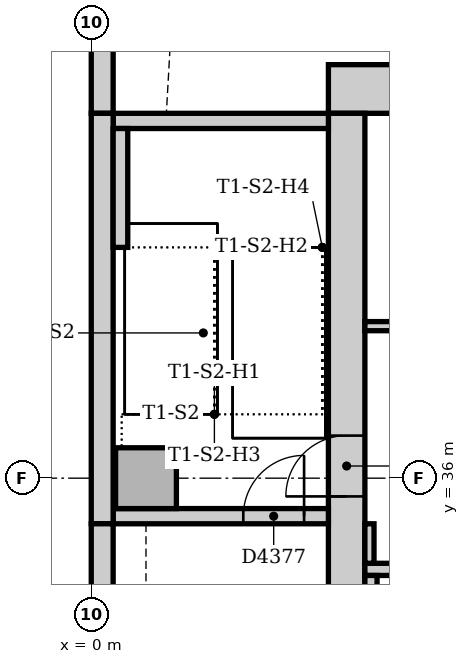
"""IFC4 building model, lengths in metres.
Left out: names, types, materials, properties, quantities, classifications, styles, units other than length and angle.
Written with IfcOpenShell. Run it as: python <this file> out.ifc"""

import sys

from ifc_helpers import new_model, si_unit, direction, frame, frame_2d, origin, origin_2d, place, context, subcontext, project, spatial, rectangle, extrude, element, fill, save


model = new_model("IFC4")
c1 = context("Model", 3, precision=1e-05, world=origin(), true_north=direction((0.0, 1.0)))
c2 = subcontext(c1, "Body", "Model", "MODEL_VIEW")
j1 = project(units=[si_unit("LENGTHUNIT", "METRE"), si_unit("PLANEANGLEUNIT", "RADIAN")], contexts=[c1])
p1 = place(None, origin())
s1 = spatial("IfcSite", under=j1, at=p1, CompositionType="ELEMENT")
p2 = place(p1, origin())
s2 = spatial("IfcBuilding", under=s1, at=p2, CompositionType="ELEMENT")
p3 = place(p2, frame((0.0, 0.0, 144.0)))
s3 = spatial("IfcBuildingStorey", under=s2, at=p3, CompositionType="ELEMENT", Elevation=144.0)
p4 = place(p3, frame((23.3, 42.4, 0.0), z_axis=(0.0, 0.0, 1.0), x_axis=(-1.0, 0.0, 0.0)))
e1 = element("IfcWall", 1, at=p4, inside=s3, PredefinedType="SOLIDWALL", context=c2, shape_type="SweptSolid", body=[
    extrude(rectangle(XDim=19.4, YDim=0.8, at=frame_2d((9.7, 0.0))), origin(), (0.0, 0.0, 1.0), 5.0),
])
p5 = place(p3, frame((4.2, 42.0, 0.0), z_axis=(0.0, 0.0, 1.0), x_axis=(0.0, -1.0, 0.0)))
e2 = element("IfcWall", 2, at=p5, inside=s3, PredefinedType="SOLIDWALL", context=c2, shape_type="SweptSolid", body=[
    extrude(rectangle(XDim=10.5, YDim=0.6, at=frame_2d((5.25, 0.0))), origin(), (0.0, 0.0, 1.0), 5.0),
])
p6 = place(p5, frame((5.3, 0.0, 0.0)))
e3 = element("IfcOpeningElement", 3, at=p6, cuts=e2, PredefinedType="OPENING", context=c2, shape_type="SweptSolid", body=[
    extrude(rectangle(XDim=1.0, YDim=2.1, at=frame_2d((0.5, 1.05))), frame((0.0, 0.31, 0.0), z_axis=(0.0, -1.0, 0.0), x_axis=(1.0, 0.0, 0.0)), (0.0, 0.0, 1.0), 0.62),
])
p7 = place(p3, frame((0.36, 35.375, 0.0), z_axis=(0.0, 0.0, 1.0), x_axis=(1.0, 0.0, 0.0)))
e4 = element("IfcWall", 4, at=p7, inside=s3, PredefinedType="SOLIDWALL", context=c2, shape_type="SweptSolid", body=[
    extrude(rectangle(XDim=3.54, YDim=0.25, at=frame_2d((1.77, 0.0))), origin(), (0.0, 0.0, 1.0), 5.0),
])
p8 = place(p7, frame((2.14, 0.0, 0.0)))
e5 = element("IfcOpeningElement", 5, at=p8, cuts=e4, PredefinedType="OPENING", context=c2, shape_type="SweptSolid", body=[
    extrude(rectangle(XDim=1.0, YDim=2.1, at=frame_2d((0.5, 1.05))), frame((0.0, 0.135, 0.0), z_axis=(0.0, -1.0, 0.0), x_axis=(1.0, 0.0, 0.0)), (0.0, 0.0, 1.0), 0.27),
])
p9 = place(p3, frame((3.9, 41.875, 0.0), z_axis=(0.0, 0.0, 1.0), x_axis=(-1.0, 0.0, 0.0)))
e6 = element("IfcWall", 6, at=p9, inside=s3, PredefinedType="SOLIDWALL", context=c2, shape_type="SweptSolid", body=[
    extrude(rectangle(XDim=3.54, YDim=0.25, at=frame_2d((1.77, 0.0))), origin(), (0.0, 0.0, 1.0), 5.0),
])
p10 = place(p3, frame((0.9, 36.0, 0.0), z_axis=(0.0, 0.0, 1.0), x_axis=(1.0, 0.0, 0.0)))
e7 = element("IfcColumn", 7, at=p10, inside=s3, PredefinedType="COLUMN", context=c2, shape_type="SweptSolid", body=[
    extrude(rectangle(XDim=1.0, YDim=1.0, at=origin_2d()), origin(), (0.0, 0.0, 1.0), 5.0),
])
p11 = place(p3, frame((0.18, 45.257, 0.0), z_axis=(0.0, 0.0, 1.0), x_axis=(0.0, -1.0, 0.0)))
e8 = element("IfcWall", 8, at=p11, inside=s3, PredefinedType="STANDARD", context=c2, shape_type="SweptSolid", body=[
    extrude(rectangle(XDim=3.257, YDim=0.36, at=frame_2d((1.629, 0.0))), origin(), (0.0, 0.0, 1.0), 4.85),
])
p12 = place(p3, frame((0.18, 42.0, 0.0), z_axis=(0.0, 0.0, 1.0), x_axis=(0.0, -1.0, 0.0)))
e9 = element("IfcWall", 9, at=p12, inside=s3, PredefinedType="STANDARD", context=c2, shape_type="SweptSolid", body=[
    extrude(rectangle(XDim=6.75, YDim=0.36, at=frame_2d((3.375, 0.0))), origin(), (0.0, 0.0, 1.0), 4.85),
])
p13 = place(p3, frame((0.18, 35.25, 0.0), z_axis=(0.0, 0.0, 1.0), x_axis=(0.0, -1.0, 0.0)))
e10 = element("IfcWall", 10, at=p13, inside=s3, PredefinedType="STANDARD", context=c2, shape_type="SweptSolid", body=[
    extrude(rectangle(XDim=7.5, YDim=0.36, at=frame_2d((3.75, 0.0))), origin(), (0.0, 0.0, 1.0), 4.85),
])
p14 = place(p3, frame((0.48, 39.795, 0.0), z_axis=(0.0, 0.0, 1.0), x_axis=(0.0, 1.0, 0.0)))
e11 = element("IfcWall", 11, at=p14, inside=s3, PredefinedType="STANDARD", context=c2, shape_type="SweptSolid", body=[
    extrude(rectangle(XDim=1.955, YDim=0.24, at=frame_2d((0.978, 0.0))), origin(), (0.0, 0.0, 1.0), 5.0),
])
p15 = place(p3, frame((4.5, 34.5, 0.0), z_axis=(0.0, 0.0, 1.0), x_axis=(1.0, 0.0, 0.0)))
e12 = element("IfcWall", 12, at=p15, inside=s3, PredefinedType="PARTITIONING", context=c2, shape_type="SweptSolid", body=[
    extrude(rectangle(XDim=18.0, YDim=0.2, at=frame_2d((9.0, 0.0))), origin(), (0.0, 0.0, 1.0), 4.85),
])
p16 = place(p15, frame((0.95, 0.0, 0.0)))
e13 = element("IfcOpeningElement", 13, at=p16, cuts=e12, PredefinedType="OPENING", context=c2, shape_type="SweptSolid", body=[
    extrude(rectangle(XDim=1.1, YDim=2.1, at=frame_2d((0.55, 1.05))), frame((0.0, 0.11, 0.0), z_axis=(0.0, -1.0, 0.0), x_axis=(1.0, 0.0, 0.0)), (0.0, 0.0, 1.0), 0.22),
])
p17 = place(p15, frame((3.95, 0.0, 0.0)))
e14 = element("IfcOpeningElement", 14, at=p17, cuts=e12, PredefinedType="OPENING", context=c2, shape_type="SweptSolid", body=[
    extrude(rectangle(XDim=1.1, YDim=2.1, at=frame_2d((0.55, 1.05))), frame((0.0, 0.11, 0.0), z_axis=(0.0, -1.0, 0.0), x_axis=(1.0, 0.0, 0.0)), (0.0, 0.0, 1.0), 0.22),
])
p18 = place(p15, frame((12.95, 0.0, 0.0)))
e15 = element("IfcOpeningElement", 15, at=p18, cuts=e12, PredefinedType="OPENING", context=c2, shape_type="SweptSolid", body=[
    extrude(rectangle(XDim=1.1, YDim=2.1, at=frame_2d((0.55, 1.05))), frame((0.0, 0.11, 0.0), z_axis=(0.0, -1.0, 0.0), x_axis=(1.0, 0.0, 0.0)), (0.0, 0.0, 1.0), 0.22),
])
p19 = place(p15, frame((15.95, 0.0, 0.0)))
e16 = element("IfcOpeningElement", 16, at=p19, cuts=e12, PredefinedType="OPENING", context=c2, shape_type="SweptSolid", body=[
    extrude(rectangle(XDim=1.1, YDim=2.1, at=frame_2d((0.55, 1.05))), frame((0.0, 0.11, 0.0), z_axis=(0.0, -1.0, 0.0), x_axis=(1.0, 0.0, 0.0)), (0.0, 0.0, 1.0), 0.22),
])
p20 = place(p3, frame((4.6, 31.75, 0.0), z_axis=(0.0, 0.0, 1.0), x_axis=(0.0, 1.0, 0.0)))
e17 = element("IfcWall", 17, at=p20, inside=s3, PredefinedType="PARTITIONING", context=c2, shape_type="SweptSolid", body=[
    extrude(rectangle(XDim=2.65, YDim=0.2, at=frame_2d((1.325, 0.0))), origin(), (0.0, 0.0, 1.0), 4.85),
])
p21 = place(p3, frame((4.5, 38.5, 0.0), z_axis=(0.0, 0.0, 1.0), x_axis=(1.0, 0.0, 0.0)))
e18 = element("IfcWall", 18, at=p21, inside=s3, PredefinedType="PARTITIONING", context=c2, shape_type="SweptSolid", body=[
    extrude(rectangle(XDim=11.9, YDim=0.15, at=frame_2d((5.95, 0.0))), origin(), (0.0, 0.0, 1.0), 4.85),
])
p22 = place(p21, frame((1.1, 0.0, 0.0)))
e19 = element("IfcOpeningElement", 19, at=p22, cuts=e18, PredefinedType="OPENING", context=c2, shape_type="SweptSolid", body=[
    extrude(rectangle(XDim=0.9, YDim=2.1, at=frame_2d((0.45, 1.05))), frame((0.0, 0.085, 0.0), z_axis=(0.0, -1.0, 0.0), x_axis=(1.0, 0.0, 0.0)), (0.0, 0.0, 1.0), 0.17),
])
p23 = place(p21, frame((4.05, 0.0, 0.0)))
e20 = element("IfcOpeningElement", 20, at=p23, cuts=e18, PredefinedType="OPENING", context=c2, shape_type="SweptSolid", body=[
    extrude(rectangle(XDim=0.9, YDim=2.1, at=frame_2d((0.45, 1.05))), frame((0.0, 0.085, 0.0), z_axis=(0.0, -1.0, 0.0), x_axis=(1.0, 0.0, 0.0)), (0.0, 0.0, 1.0), 0.17),
])
p24 = place(p21, frame((7.05, 0.0, 0.0)))
e21 = element("IfcOpeningElement", 21, at=p24, cuts=e18, PredefinedType="OPENING", context=c2, shape_type="SweptSolid", body=[
    extrude(rectangle(XDim=0.9, YDim=2.1, at=frame_2d((0.45, 1.05))), frame((0.0, 0.085, 0.0), z_axis=(0.0, -1.0, 0.0), x_axis=(1.0, 0.0, 0.0)), (0.0, 0.0, 1.0), 0.17),
])
p25 = place(p21, frame((9.95, 0.0, 0.0)))
e22 = element("IfcOpeningElement", 22, at=p25, cuts=e18, PredefinedType="OPENING", context=c2, shape_type="SweptSolid", body=[
    extrude(rectangle(XDim=0.8, YDim=2.1, at=frame_2d((0.4, 1.05))), frame((0.0, 0.085, 0.0), z_axis=(0.0, -1.0, 0.0), x_axis=(1.0, 0.0, 0.0)), (0.0, 0.0, 1.0), 0.17),
])
p26 = place(p3, frame((4.575, 34.6, 0.0), z_axis=(0.0, 0.0, 1.0), x_axis=(0.0, 1.0, 0.0)))
e23 = element("IfcWall", 23, at=p26, inside=s3, PredefinedType="PARTITIONING", context=c2, shape_type="SweptSolid", body=[
    extrude(rectangle(XDim=0.65, YDim=0.15, at=frame_2d((0.325, 0.0))), origin(), (0.0, 0.0, 1.0), 4.85),
])
p27 = place(p6, frame((1.0, 0.0, 0.0), z_axis=(0.0, 0.0, 1.0), x_axis=(-1.0, 0.0, 0.0)))
e24 = element("IfcDoor", 24, at=p27, inside=s3, OperationType="SINGLE_SWING_LEFT", PredefinedType="DOOR", context=c2, shape_type="SweptSolid", body=[
    extrude(rectangle(XDim=1.0, YDim=2.1, at=frame_2d((0.5, 1.05))), frame((0.0, 0.025, 0.0), z_axis=(0.0, -1.0, 0.0), x_axis=(1.0, 0.0, 0.0)), (0.0, 0.0, 1.0), 0.05),
])
fill(e3, e24)
p28 = place(p8, origin())
e25 = element("IfcDoor", 25, at=p28, inside=s3, OperationType="SINGLE_SWING_RIGHT", PredefinedType="DOOR", context=c2, shape_type="SweptSolid", body=[
    extrude(rectangle(XDim=1.0, YDim=2.1, at=frame_2d((0.5, 1.05))), frame((0.0, 0.025, 0.0), z_axis=(0.0, -1.0, 0.0), x_axis=(1.0, 0.0, 0.0)), (0.0, 0.0, 1.0), 0.05),
])
fill(e5, e25)
save(model, sys.argv[1])
